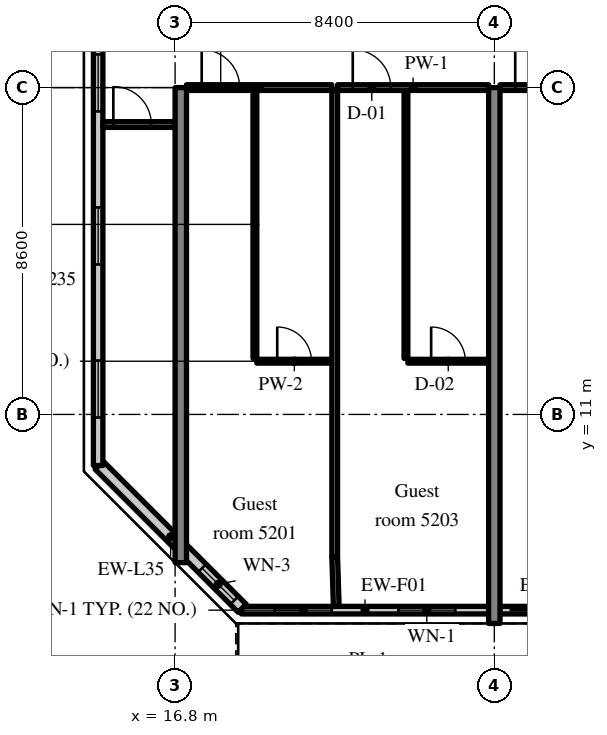
"""IFC4 building model, lengths in metres.
Left out: names, types, materials, properties, quantities, classifications, styles, units other than length and angle.
Written with IfcOpenShell. Run it as: python <this file> out.ifc"""

import sys

from ifc_helpers import new_model, si_unit, direction, frame, frame_2d, origin, place, context, subcontext, project, spatial, rectangle, extrude, source, transform, mapped, element, fill, save


model = new_model("IFC4")
c1 = context("Model", 3, precision=1e-05, world=origin(), true_north=direction((0.0, 1.0)))
c2 = subcontext(c1, "Body", "Model", "MODEL_VIEW")
j1 = project(units=[si_unit("LENGTHUNIT", "METRE"), si_unit("PLANEANGLEUNIT", "RADIAN")], contexts=[c1])
p1 = place(None, origin())
s1 = spatial("IfcSite", under=j1, at=p1, CompositionType="ELEMENT")
p2 = place(p1, origin())
s2 = spatial("IfcBuilding", under=s1, at=p2, CompositionType="ELEMENT")
p3 = place(p2, frame((0.0, 0.0, 217.9)))
s3 = spatial("IfcBuildingStorey", under=s2, at=p3, CompositionType="ELEMENT", Elevation=217.9)
m1 = source(origin(), c2, "Body", "SweptSolid", [
    extrude(rectangle(XDim=12.5, YDim=0.3, at=frame_2d((6.25, 0.0))), origin(), (0.0, 0.0, 1.0), 3.62),
])
p4 = place(p3, frame((16.95, 7.1, 0.0), z_axis=(0.0, 0.0, 1.0), x_axis=(0.0, 1.0, 0.0)))
e1 = element("IfcWall", 1, at=p4, inside=s3, PredefinedType="SHEAR", context=c2, shape_type="MappedRepresentation", body=[
    mapped(m1, transform((0.0, 0.0, 0.0), scale=1.0)),
])
m2 = source(origin(), c2, "Body", "SweptSolid", [
    extrude(rectangle(XDim=14.1, YDim=0.3, at=frame_2d((7.05, 0.0))), origin(), (0.0, 0.0, 1.0), 3.62),
])
p5 = place(p3, frame((25.2, 5.5, 0.0), z_axis=(0.0, 0.0, 1.0), x_axis=(0.0, 1.0, 0.0)))
e2 = element("IfcWall", 2, at=p5, inside=s3, PredefinedType="SHEAR", context=c2, shape_type="MappedRepresentation", body=[
    mapped(m2, transform((0.0, 0.0, 0.0), scale=1.0)),
])
m3 = source(origin(), c2, "Body", "SweptSolid", [
    extrude(rectangle(XDim=6.505, YDim=0.2, at=frame_2d((3.252, 0.0))), origin(), (0.0, 0.0, 1.0), 3.02),
])
p6 = place(p3, frame((18.545, 5.85, 0.0), z_axis=(0.0, 0.0, 1.0), x_axis=(1.0, 0.0, 0.0)))
e3 = element("IfcWall", 3, at=p6, inside=s3, PredefinedType="SOLIDWALL", context=c2, shape_type="MappedRepresentation", body=[
    mapped(m3, transform((0.0, 0.0, 0.0), scale=1.0)),
])
m4 = source(origin(), c2, "Body", "SweptSolid", [
    extrude(rectangle(XDim=1.5, YDim=1.5, at=frame_2d((0.75, 0.75))), frame((0.0, 0.11, 0.0), z_axis=(0.0, -1.0, 0.0), x_axis=(1.0, 0.0, 0.0)), (0.0, 0.0, 1.0), 0.22),
])
p7 = place(p6, frame((0.876, 0.0, 0.9)))
e4 = element("IfcOpeningElement", 4, at=p7, cuts=e3, PredefinedType="OPENING", context=c2, shape_type="MappedRepresentation", body=[
    mapped(m4, transform((0.0, 0.0, 0.0), scale=1.0)),
])
p8 = place(p6, frame((4.129, 0.0, 0.9)))
e5 = element("IfcOpeningElement", 5, at=p8, cuts=e3, PredefinedType="OPENING", context=c2, shape_type="MappedRepresentation", body=[
    mapped(m4, transform((0.0, 0.0, 0.0), scale=1.0)),
])
m5 = source(origin(), c2, "Body", "SweptSolid", [
    extrude(rectangle(XDim=8.1, YDim=0.2, at=frame_2d((4.05, 0.0))), origin(), (0.0, 0.0, 1.0), 3.02),
])
p9 = place(p3, frame((25.35, 5.85, 0.0), z_axis=(0.0, 0.0, 1.0), x_axis=(1.0, 0.0, 0.0)))
e6 = element("IfcWall", 6, at=p9, inside=s3, PredefinedType="SOLIDWALL", context=c2, shape_type="MappedRepresentation", body=[
    mapped(m5, transform((0.0, 0.0, 0.0), scale=1.0)),
])
m6 = source(origin(), c2, "Body", "SweptSolid", [
    extrude(rectangle(XDim=1.2, YDim=2.4, at=frame_2d((0.6, 1.2))), frame((0.0, 0.11, 0.0), z_axis=(0.0, -1.0, 0.0), x_axis=(1.0, 0.0, 0.0)), (0.0, 0.0, 1.0), 0.22),
])
p10 = place(p9, frame((0.25, 0.0, 0.0)))
e7 = element("IfcOpeningElement", 7, at=p10, cuts=e6, PredefinedType="OPENING", context=c2, shape_type="MappedRepresentation", body=[
    mapped(m6, transform((0.0, 0.0, 0.0), scale=1.0)),
])
p11 = place(p9, frame((2.3, 0.0, 0.9)))
e8 = element("IfcOpeningElement", 8, at=p11, cuts=e6, PredefinedType="OPENING", context=c2, shape_type="MappedRepresentation", body=[
    mapped(m4, transform((0.0, 0.0, 0.0), scale=1.0)),
])
p12 = place(p9, frame((4.3, 0.0, 0.0)))
e9 = element("IfcOpeningElement", 9, at=p12, cuts=e6, PredefinedType="OPENING", context=c2, shape_type="MappedRepresentation", body=[
    mapped(m6, transform((0.0, 0.0, 0.0), scale=1.0)),
])
p13 = place(p9, frame((6.35, 0.0, 0.9)))
e10 = element("IfcOpeningElement", 10, at=p13, cuts=e6, PredefinedType="OPENING", context=c2, shape_type="MappedRepresentation", body=[
    mapped(m4, transform((0.0, 0.0, 0.0), scale=1.0)),
])
m7 = source(origin(), c2, "Body", "SweptSolid", [
    extrude(rectangle(XDim=5.326, YDim=0.3, at=frame_2d((2.663, 0.0))), origin(), (0.0, 0.0, 1.0), 3.62),
])
p14 = place(p3, frame((14.8, 9.666, 0.0), z_axis=(0.0, 0.0, 1.0), x_axis=(0.707083859269, -0.707129702361, 0.0)))
e11 = element("IfcWall", 11, at=p14, inside=s3, PredefinedType="SOLIDWALL", context=c2, shape_type="MappedRepresentation", body=[
    mapped(m7, transform((0.0, 0.0, 0.0), scale=1.0)),
])
m8 = source(origin(), c2, "Body", "SweptSolid", [
    extrude(rectangle(XDim=1.2, YDim=1.5, at=frame_2d((0.6, 0.75))), frame((0.0, 0.16, 0.0), z_axis=(0.0, -1.0, 0.0), x_axis=(1.0, 0.0, 0.0)), (0.0, 0.0, 1.0), 0.32),
])
p15 = place(p14, frame((3.833, 0.0, 0.9)))
e12 = element("IfcOpeningElement", 12, at=p15, cuts=e11, PredefinedType="OPENING", context=c2, shape_type="MappedRepresentation", body=[
    mapped(m8, transform((0.0, 0.0, 0.0), scale=1.0)),
])
m9 = source(origin(), c2, "Body", "SweptSolid", [
    extrude(rectangle(XDim=28.189, YDim=0.25, at=frame_2d((14.095, 0.0))), origin(), (0.0, 0.0, 1.0), 3.62),
])
p16 = place(p3, frame((14.775, 37.845, 0.0), z_axis=(0.0, 0.0, 1.0), x_axis=(0.0, -1.0, 0.0)))
e13 = element("IfcWall", 13, at=p16, inside=s3, PredefinedType="SOLIDWALL", context=c2, shape_type="MappedRepresentation", body=[
    mapped(m9, transform((0.0, 0.0, 0.0), scale=1.0)),
])
m10 = source(origin(), c2, "Body", "SweptSolid", [
    extrude(rectangle(XDim=1.5, YDim=1.5, at=frame_2d((0.75, 0.75))), frame((0.0, 0.135, 0.0), z_axis=(0.0, -1.0, 0.0), x_axis=(1.0, 0.0, 0.0)), (0.0, 0.0, 1.0), 0.27),
])
p17 = place(p16, frame((1.263, 0.0, 0.9)))
e14 = element("IfcOpeningElement", 14, at=p17, cuts=e13, PredefinedType="OPENING", context=c2, shape_type="MappedRepresentation", body=[
    mapped(m10, transform((0.0, 0.0, 0.0), scale=1.0)),
])
p18 = place(p16, frame((5.291, 0.0, 0.9)))
e15 = element("IfcOpeningElement", 15, at=p18, cuts=e13, PredefinedType="OPENING", context=c2, shape_type="MappedRepresentation", body=[
    mapped(m10, transform((0.0, 0.0, 0.0), scale=1.0)),
])
p19 = place(p16, frame((9.318, 0.0, 0.9)))
e16 = element("IfcOpeningElement", 16, at=p19, cuts=e13, PredefinedType="OPENING", context=c2, shape_type="MappedRepresentation", body=[
    mapped(m10, transform((0.0, 0.0, 0.0), scale=1.0)),
])
p20 = place(p16, frame((13.345, 0.0, 0.9)))
e17 = element("IfcOpeningElement", 17, at=p20, cuts=e13, PredefinedType="OPENING", context=c2, shape_type="MappedRepresentation", body=[
    mapped(m10, transform((0.0, 0.0, 0.0), scale=1.0)),
])
p21 = place(p16, frame((17.372, 0.0, 0.9)))
e18 = element("IfcOpeningElement", 18, at=p21, cuts=e13, PredefinedType="OPENING", context=c2, shape_type="MappedRepresentation", body=[
    mapped(m10, transform((0.0, 0.0, 0.0), scale=1.0)),
])
p22 = place(p16, frame((21.399, 0.0, 0.9)))
e19 = element("IfcOpeningElement", 19, at=p22, cuts=e13, PredefinedType="OPENING", context=c2, shape_type="MappedRepresentation", body=[
    mapped(m10, transform((0.0, 0.0, 0.0), scale=1.0)),
])
p23 = place(p16, frame((25.426, 0.0, 0.9)))
e20 = element("IfcOpeningElement", 20, at=p23, cuts=e13, PredefinedType="OPENING", context=c2, shape_type="MappedRepresentation", body=[
    mapped(m10, transform((0.0, 0.0, 0.0), scale=1.0)),
])
m11 = source(origin(), c2, "Body", "SweptSolid", [
    extrude(rectangle(XDim=7.05, YDim=0.1, at=frame_2d((3.525, 0.0))), origin(), (0.0, 0.0, 1.0), 3.62),
])
p24 = place(p3, frame((18.9, 12.475, 0.0), z_axis=(0.0, 0.0, 1.0), x_axis=(0.0, 1.0, 0.0)))
e21 = element("IfcWall", 21, at=p24, inside=s3, PredefinedType="PARTITIONING", context=c2, shape_type="MappedRepresentation", body=[
    mapped(m11, transform((0.0, 0.0, 0.0), scale=1.0)),
])
m12 = source(origin(), c2, "Body", "SweptSolid", [
    extrude(rectangle(XDim=1.975, YDim=0.1, at=frame_2d((0.988, 0.0))), origin(), (0.0, 0.0, 1.0), 3.62),
])
p25 = place(p3, frame((18.95, 12.4, 0.0), z_axis=(0.0, 0.0, 1.0), x_axis=(1.0, 0.0, 0.0)))
e22 = element("IfcWall", 22, at=p25, inside=s3, PredefinedType="PARTITIONING", context=c2, shape_type="MappedRepresentation", body=[
    mapped(m12, transform((0.0, 0.0, 0.0), scale=1.0)),
])
m13 = source(origin(), c2, "Body", "SweptSolid", [
    extrude(rectangle(XDim=0.9, YDim=2.1, at=frame_2d((0.45, 1.05))), frame((0.0, 0.06, 0.0), z_axis=(0.0, -1.0, 0.0), x_axis=(1.0, 0.0, 0.0)), (0.0, 0.0, 1.0), 0.12),
])
p26 = place(p25, frame((0.538, 0.0, 0.0)))
e23 = element("IfcOpeningElement", 23, at=p26, cuts=e22, PredefinedType="OPENING", context=c2, shape_type="MappedRepresentation", body=[
    mapped(m13, transform((0.0, 0.0, 0.0), scale=1.0)),
])
m14 = source(origin(), c2, "Body", "SweptSolid", [
    extrude(rectangle(XDim=3.825, YDim=0.15, at=frame_2d((1.913, 0.0))), origin(), (0.0, 0.0, 1.0), 2.92),
])
p27 = place(p3, frame((17.1, 19.6, 0.0), z_axis=(0.0, 0.0, 1.0), x_axis=(1.0, 0.0, 0.0)))
e24 = element("IfcWall", 24, at=p27, inside=s3, PredefinedType="PARTITIONING", context=c2, shape_type="MappedRepresentation", body=[
    mapped(m14, transform((0.0, 0.0, 0.0), scale=1.0)),
])
m15 = source(origin(), c2, "Body", "SweptSolid", [
    extrude(rectangle(XDim=1.0, YDim=2.1, at=frame_2d((0.5, 1.05))), frame((0.0, 0.085, 0.0), z_axis=(0.0, -1.0, 0.0), x_axis=(1.0, 0.0, 0.0)), (0.0, 0.0, 1.0), 0.17),
])
p28 = place(p27, frame((0.4, 0.0, 0.0)))
e25 = element("IfcOpeningElement", 25, at=p28, cuts=e24, PredefinedType="OPENING", context=c2, shape_type="MappedRepresentation", body=[
    mapped(m15, transform((0.0, 0.0, 0.0), scale=1.0)),
])
p29 = place(p3, frame((22.875, 12.475, 0.0), z_axis=(0.0, 0.0, 1.0), x_axis=(0.0, 1.0, 0.0)))
e26 = element("IfcWall", 26, at=p29, inside=s3, PredefinedType="PARTITIONING", context=c2, shape_type="MappedRepresentation", body=[
    mapped(m11, transform((0.0, 0.0, 0.0), scale=1.0)),
])
m16 = source(origin(), c2, "Body", "SweptSolid", [
    extrude(rectangle(XDim=2.125, YDim=0.1, at=frame_2d((1.062, 0.0))), origin(), (0.0, 0.0, 1.0), 3.62),
])
p30 = place(p3, frame((22.925, 12.4, 0.0), z_axis=(0.0, 0.0, 1.0), x_axis=(1.0, 0.0, 0.0)))
e27 = element("IfcWall", 27, at=p30, inside=s3, PredefinedType="PARTITIONING", context=c2, shape_type="MappedRepresentation", body=[
    mapped(m16, transform((0.0, 0.0, 0.0), scale=1.0)),
])
p31 = place(p30, frame((0.613, 0.0, 0.0)))
e28 = element("IfcOpeningElement", 28, at=p31, cuts=e27, PredefinedType="OPENING", context=c2, shape_type="MappedRepresentation", body=[
    mapped(m13, transform((0.0, 0.0, 0.0), scale=1.0)),
])
m17 = source(origin(), c2, "Body", "SweptSolid", [
    extrude(rectangle(XDim=3.975, YDim=0.15, at=frame_2d((1.988, 0.0))), origin(), (0.0, 0.0, 1.0), 2.92),
])
p32 = place(p3, frame((21.075, 19.6, 0.0), z_axis=(0.0, 0.0, 1.0), x_axis=(1.0, 0.0, 0.0)))
e29 = element("IfcWall", 29, at=p32, inside=s3, PredefinedType="PARTITIONING", context=c2, shape_type="MappedRepresentation", body=[
    mapped(m17, transform((0.0, 0.0, 0.0), scale=1.0)),
])
p33 = place(p32, frame((0.4, 0.0, 0.0)))
e30 = element("IfcOpeningElement", 30, at=p33, cuts=e29, PredefinedType="OPENING", context=c2, shape_type="MappedRepresentation", body=[
    mapped(m15, transform((0.0, 0.0, 0.0), scale=1.0)),
])
m18 = source(origin(), c2, "Body", "SweptSolid", [
    extrude(rectangle(XDim=12.275, YDim=0.15, at=frame_2d((6.137, 0.0))), origin(), (0.0, 0.0, 1.0), 3.62),
])
p34 = place(p3, frame((21.0, 7.25, 0.0), z_axis=(0.0, 0.0, 1.0), x_axis=(0.0, 1.0, 0.0)))
e31 = element("IfcWall", 31, at=p34, inside=s3, PredefinedType="PARTITIONING", context=c2, shape_type="MappedRepresentation", body=[
    mapped(m18, transform((0.0, 0.0, 0.0), scale=1.0)),
])
m19 = source(origin(), c2, "Body", "SweptSolid", [
    extrude(rectangle(XDim=8.1, YDim=0.15, at=frame_2d((4.05, 0.0))), origin(), (0.0, 0.0, 1.0), 2.92),
])
p35 = place(p3, frame((25.35, 19.6, 0.0), z_axis=(0.0, 0.0, 1.0), x_axis=(1.0, 0.0, 0.0)))
e32 = element("IfcWall", 32, at=p35, inside=s3, PredefinedType="PARTITIONING", context=c2, shape_type="MappedRepresentation", body=[
    mapped(m19, transform((0.0, 0.0, 0.0), scale=1.0)),
])
p36 = place(p35, frame((0.4, 0.0, 0.0)))
e33 = element("IfcOpeningElement", 33, at=p36, cuts=e32, PredefinedType="OPENING", context=c2, shape_type="MappedRepresentation", body=[
    mapped(m15, transform((0.0, 0.0, 0.0), scale=1.0)),
])
m20 = source(origin(), c2, "Body", "SweptSolid", [
    extrude(rectangle(XDim=1.9, YDim=0.15, at=frame_2d((0.95, 0.0))), origin(), (0.0, 0.0, 1.0), 2.92),
])
p37 = place(p3, frame((14.9, 18.628, 0.0), z_axis=(0.0, 0.0, 1.0), x_axis=(1.0, 0.0, 0.0)))
e34 = element("IfcWall", 34, at=p37, inside=s3, PredefinedType="PARTITIONING", context=c2, shape_type="MappedRepresentation", body=[
    mapped(m20, transform((0.0, 0.0, 0.0), scale=1.0)),
])
p38 = place(p37, frame((0.275, 0.0, 0.0)))
e35 = element("IfcOpeningElement", 35, at=p38, cuts=e34, PredefinedType="OPENING", context=c2, shape_type="MappedRepresentation", body=[
    mapped(m15, transform((0.0, 0.0, 0.0), scale=1.0)),
])
m21 = source(origin(), c2, "Body", "SweptSolid", [
    extrude(rectangle(XDim=1.301, YDim=0.15, at=frame_2d((0.65, 0.0))), origin(), (0.0, 0.0, 1.0), 3.62),
])
p39 = place(p3, frame((21.041, 5.95, 0.0), z_axis=(0.0, 0.0, 1.0), x_axis=(-0.031533606063, 0.999502692187, 0.0)))
e36 = element("IfcWall", 36, at=p39, inside=s3, PredefinedType="PARTITIONING", context=c2, shape_type="MappedRepresentation", body=[
    mapped(m21, transform((0.0, 0.0, 0.0), scale=1.0)),
])
m22 = source(origin(), c2, "Body", "SweptSolid", [
    extrude(rectangle(XDim=1.5, YDim=1.5, at=frame_2d((0.75, 0.75))), frame((0.0, 0.03, 0.0), z_axis=(0.0, -1.0, 0.0), x_axis=(1.0, 0.0, 0.0)), (0.0, 0.0, 1.0), 0.06),
])
p40 = place(p7, origin())
e37 = element("IfcWindow", 37, at=p40, inside=s3, PartitioningType="SINGLE_PANEL", PredefinedType="WINDOW", context=c2, shape_type="MappedRepresentation", body=[
    mapped(m22, transform((0.0, 0.0, 0.0), scale=1.0)),
])
fill(e4, e37)
p41 = place(p8, origin())
e38 = element("IfcWindow", 38, at=p41, inside=s3, PartitioningType="SINGLE_PANEL", PredefinedType="WINDOW", context=c2, shape_type="MappedRepresentation", body=[
    mapped(m22, transform((0.0, 0.0, 0.0), scale=1.0)),
])
fill(e5, e38)
m23 = source(origin(), c2, "Body", "SweptSolid", [
    extrude(rectangle(XDim=1.2, YDim=2.4, at=frame_2d((0.6, 1.2))), frame((0.0, 0.025, 0.0), z_axis=(0.0, -1.0, 0.0), x_axis=(1.0, 0.0, 0.0)), (0.0, 0.0, 1.0), 0.05),
])
p42 = place(p10, origin())
e39 = element("IfcDoor", 39, at=p42, inside=s3, OperationType="SLIDING_TO_LEFT", PredefinedType="DOOR", context=c2, shape_type="MappedRepresentation", body=[
    mapped(m23, transform((0.0, 0.0, 0.0), scale=1.0)),
])
fill(e7, e39)
m24 = source(origin(), c2, "Body", "SweptSolid", [
    extrude(rectangle(XDim=1.2, YDim=1.5, at=frame_2d((0.6, 0.75))), frame((0.0, 0.03, 0.0), z_axis=(0.0, -1.0, 0.0), x_axis=(1.0, 0.0, 0.0)), (0.0, 0.0, 1.0), 0.06),
])
p43 = place(p15, origin())
e40 = element("IfcWindow", 40, at=p43, inside=s3, PartitioningType="SINGLE_PANEL", PredefinedType="WINDOW", context=c2, shape_type="MappedRepresentation", body=[
    mapped(m24, transform((0.0, 0.0, 0.0), scale=1.0)),
])
fill(e12, e40)
p44 = place(p21, origin())
e41 = element("IfcWindow", 41, at=p44, inside=s3, PartitioningType="SINGLE_PANEL", PredefinedType="WINDOW", context=c2, shape_type="MappedRepresentation", body=[
    mapped(m22, transform((0.0, 0.0, 0.0), scale=1.0)),
])
fill(e18, e41)
p45 = place(p22, origin())
e42 = element("IfcWindow", 42, at=p45, inside=s3, PartitioningType="SINGLE_PANEL", PredefinedType="WINDOW", context=c2, shape_type="MappedRepresentation", body=[
    mapped(m22, transform((0.0, 0.0, 0.0), scale=1.0)),
])
fill(e19, e42)
p46 = place(p23, origin())
e43 = element("IfcWindow", 43, at=p46, inside=s3, PartitioningType="SINGLE_PANEL", PredefinedType="WINDOW", context=c2, shape_type="MappedRepresentation", body=[
    mapped(m22, transform((0.0, 0.0, 0.0), scale=1.0)),
])
fill(e20, e43)
m25 = source(origin(), c2, "Body", "SweptSolid", [
    extrude(rectangle(XDim=0.9, YDim=2.1, at=frame_2d((0.45, 1.05))), frame((0.0, 0.025, 0.0), z_axis=(0.0, -1.0, 0.0), x_axis=(1.0, 0.0, 0.0)), (0.0, 0.0, 1.0), 0.05),
])
p47 = place(p26, origin())
e44 = element("IfcDoor", 44, at=p47, inside=s3, OperationType="SINGLE_SWING_LEFT", PredefinedType="DOOR", context=c2, shape_type="MappedRepresentation", body=[
    mapped(m25, transform((0.0, 0.0, 0.0), scale=1.0)),
])
fill(e23, e44)
m26 = source(origin(), c2, "Body", "SweptSolid", [
    extrude(rectangle(XDim=1.0, YDim=2.1, at=frame_2d((0.5, 1.05))), frame((0.0, 0.025, 0.0), z_axis=(0.0, -1.0, 0.0), x_axis=(1.0, 0.0, 0.0)), (0.0, 0.0, 1.0), 0.05),
])
p48 = place(p28, origin())
e45 = element("IfcDoor", 45, at=p48, inside=s3, OperationType="SINGLE_SWING_LEFT", PredefinedType="DOOR", context=c2, shape_type="MappedRepresentation", body=[
    mapped(m26, transform((0.0, 0.0, 0.0), scale=1.0)),
])
fill(e25, e45)
p49 = place(p31, origin())
e46 = element("IfcDoor", 46, at=p49, inside=s3, OperationType="SINGLE_SWING_LEFT", PredefinedType="DOOR", context=c2, shape_type="MappedRepresentation", body=[
    mapped(m25, transform((0.0, 0.0, 0.0), scale=1.0)),
])
fill(e28, e46)
p50 = place(p33, origin())
e47 = element("IfcDoor", 47, at=p50, inside=s3, OperationType="SINGLE_SWING_LEFT", PredefinedType="DOOR", context=c2, shape_type="MappedRepresentation", body=[
    mapped(m26, transform((0.0, 0.0, 0.0), scale=1.0)),
])
fill(e30, e47)
p51 = place(p36, origin())
e48 = element("IfcDoor", 48, at=p51, inside=s3, OperationType="SINGLE_SWING_LEFT", PredefinedType="DOOR", context=c2, shape_type="MappedRepresentation", body=[
    mapped(m26, transform((0.0, 0.0, 0.0), scale=1.0)),
])
fill(e33, e48)
p52 = place(p38, origin())
e49 = element("IfcDoor", 49, at=p52, inside=s3, OperationType="SINGLE_SWING_LEFT", PredefinedType="DOOR", context=c2, shape_type="MappedRepresentation", body=[
    mapped(m26, transform((0.0, 0.0, 0.0), scale=1.0)),
])
fill(e35, e49)
save(model, sys.argv[1])
